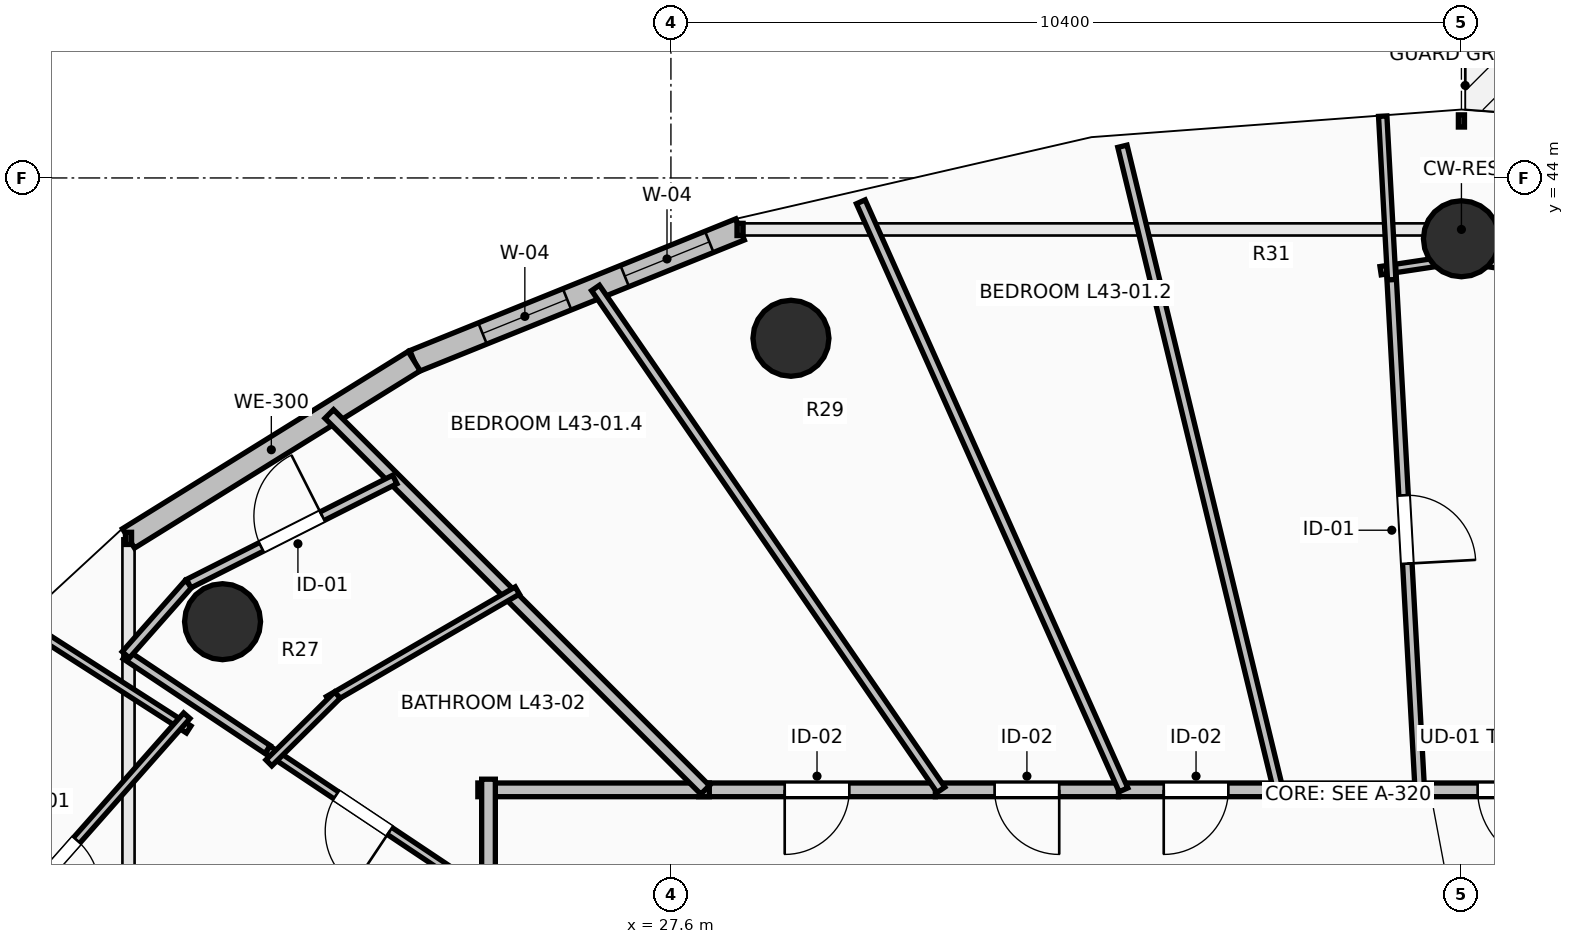
"""IFC4 building model, lengths in metres.
Left out: names, types, materials, properties, quantities, classifications, styles, units other than length and angle.
Written with IfcOpenShell. Run it as: python <this file> out.ifc"""

import sys

from ifc_helpers import new_model, si_unit, direction, frame, frame_2d, origin, origin_2d, place, context, subcontext, project, spatial, rectangle, circle, extrude, element, fill, save


model = new_model("IFC4")
c1 = context("Model", 3, precision=1e-05, world=origin(), true_north=direction((0.0, 1.0)))
c2 = subcontext(c1, "Body", "Model", "MODEL_VIEW")
j1 = project(units=[si_unit("LENGTHUNIT", "METRE"), si_unit("PLANEANGLEUNIT", "RADIAN")], contexts=[c1])
p1 = place(None, origin())
s1 = spatial("IfcSite", under=j1, at=p1, CompositionType="ELEMENT")
p2 = place(p1, origin())
s2 = spatial("IfcBuilding", under=s1, at=p2, CompositionType="ELEMENT")
p3 = place(p2, frame((0.0, 0.0, 160.6)))
s3 = spatial("IfcBuildingStorey", under=s2, at=p3, CompositionType="ELEMENT", Elevation=160.6)
for number, where, z_axis, x_axis in (
    (1, (38.0, 43.2, 0.0), (0.0, 0.0, 1.0), (0.0, 1.0, 0.0)),
    (2, (29.179, 41.891, 0.0), (0.0, 0.0, 1.0), (-0.383, 0.924, 0.0)),
    (3, (21.701, 38.162, 0.0), (0.0, 0.0, 1.0), (-0.707, 0.707, 0.0)),
):
    element("IfcColumn", number, at=place(p3, frame(where, z_axis=z_axis, x_axis=x_axis)), inside=s3, PredefinedType="COLUMN", context=c2, shape_type="SweptSolid", body=[
        extrude(circle(Radius=0.5, at=origin_2d()), origin(), (0.0, 0.0, 1.0), 3.5),
    ])
p4 = place(p3, frame((28.51, 43.323, 0.0), z_axis=(0.0, 0.0, 1.0), x_axis=(-0.927156504392, -0.374674280359, 0.0)))
e4 = element("IfcWall", 4, at=p4, inside=s3, PredefinedType="STANDARD", context=c2, shape_type="SweptSolid", body=[
    extrude(rectangle(XDim=4.625, YDim=0.3, at=frame_2d((2.312, 0.0))), origin(), (0.0, 0.0, 1.0), 3.24),
])
p5 = place(p4, frame((0.437, 0.0, 0.85)))
e5 = element("IfcOpeningElement", 5, at=p5, cuts=e4, PredefinedType="OPENING", context=c2, shape_type="SweptSolid", body=[
    extrude(rectangle(XDim=1.2, YDim=1.95, at=frame_2d((0.6, 0.975))), frame((0.0, 0.165, 0.0), z_axis=(0.0, -1.0, 0.0), x_axis=(1.0, 0.0, 0.0)), (0.0, 0.0, 1.0), 0.33),
])
p6 = place(p4, frame((2.454, 0.0, 0.85)))
e6 = element("IfcOpeningElement", 6, at=p6, cuts=e4, PredefinedType="OPENING", context=c2, shape_type="SweptSolid", body=[
    extrude(rectangle(XDim=1.2, YDim=1.95, at=frame_2d((0.6, 0.975))), frame((0.0, 0.165, 0.0), z_axis=(0.0, -1.0, 0.0), x_axis=(1.0, 0.0, 0.0)), (0.0, 0.0, 1.0), 0.33),
])
p7 = place(p3, frame((24.222, 41.59, 0.0), z_axis=(0.0, 0.0, 1.0), x_axis=(-0.849721181976, -0.527232313977, 0.0)))
e7 = element("IfcWall", 7, at=p7, inside=s3, PredefinedType="STANDARD", context=c2, shape_type="SweptSolid", body=[
    extrude(rectangle(XDim=4.423, YDim=0.3, at=frame_2d((2.211, 0.0))), origin(), (0.0, 0.0, 1.0), 3.24),
])
p8 = place(p3, frame((40.034, 35.95, 0.0), z_axis=(0.0, 0.0, 1.0), x_axis=(-1.0, 0.0, 0.0)))
e8 = element("IfcWall", 8, at=p8, inside=s3, PredefinedType="PARTITIONING", context=c2, shape_type="SweptSolid", body=[
    extrude(rectangle(XDim=2.642, YDim=0.18, at=frame_2d((1.321, 0.0))), origin(), (0.0, 0.0, 1.0), 3.24),
])
p9 = place(p8, frame((0.821, 0.0, 0.0)))
e9 = element("IfcOpeningElement", 9, at=p9, cuts=e8, PredefinedType="OPENING", context=c2, shape_type="SweptSolid", body=[
    extrude(rectangle(XDim=1.0, YDim=2.15, at=frame_2d((0.5, 1.075))), frame((0.0, 0.105, 0.0), z_axis=(0.0, -1.0, 0.0), x_axis=(1.0, 0.0, 0.0)), (0.0, 0.0, 1.0), 0.21),
])
p10 = place(p3, frame((37.392, 35.95, 0.0), z_axis=(0.0, 0.0, 1.0), x_axis=(-1.0, 0.0, 0.0)))
e10 = element("IfcWall", 10, at=p10, inside=s3, PredefinedType="PARTITIONING", context=c2, shape_type="SweptSolid", body=[
    extrude(rectangle(XDim=1.863, YDim=0.18, at=frame_2d((0.932, 0.0))), origin(), (0.0, 0.0, 1.0), 3.24),
])
p11 = place(p3, frame((35.529, 35.95, 0.0), z_axis=(0.0, 0.0, 1.0), x_axis=(-1.0, 0.0, 0.0)))
e11 = element("IfcWall", 11, at=p11, inside=s3, PredefinedType="PARTITIONING", context=c2, shape_type="SweptSolid", body=[
    extrude(rectangle(XDim=2.041, YDim=0.18, at=frame_2d((1.021, 0.0))), origin(), (0.0, 0.0, 1.0), 3.24),
])
p12 = place(p11, frame((0.595, 0.0, 0.0)))
e12 = element("IfcOpeningElement", 12, at=p12, cuts=e11, PredefinedType="OPENING", context=c2, shape_type="SweptSolid", body=[
    extrude(rectangle(XDim=0.85, YDim=2.1, at=frame_2d((0.425, 1.05))), frame((0.0, 0.105, 0.0), z_axis=(0.0, -1.0, 0.0), x_axis=(1.0, 0.0, 0.0)), (0.0, 0.0, 1.0), 0.21),
])
p13 = place(p3, frame((33.488, 35.95, 0.0), z_axis=(0.0, 0.0, 1.0), x_axis=(-1.0, 0.0, 0.0)))
e13 = element("IfcWall", 13, at=p13, inside=s3, PredefinedType="PARTITIONING", context=c2, shape_type="SweptSolid", body=[
    extrude(rectangle(XDim=2.409, YDim=0.18, at=frame_2d((1.205, 0.0))), origin(), (0.0, 0.0, 1.0), 3.24),
])
p14 = place(p13, frame((0.78, 0.0, 0.0)))
e14 = element("IfcOpeningElement", 14, at=p14, cuts=e13, PredefinedType="OPENING", context=c2, shape_type="SweptSolid", body=[
    extrude(rectangle(XDim=0.85, YDim=2.1, at=frame_2d((0.425, 1.05))), frame((0.0, 0.105, 0.0), z_axis=(0.0, -1.0, 0.0), x_axis=(1.0, 0.0, 0.0)), (0.0, 0.0, 1.0), 0.21),
])
p15 = place(p3, frame((31.079, 35.95, 0.0), z_axis=(0.0, 0.0, 1.0), x_axis=(-1.0, 0.0, 0.0)))
e15 = element("IfcWall", 15, at=p15, inside=s3, PredefinedType="PARTITIONING", context=c2, shape_type="SweptSolid", body=[
    extrude(rectangle(XDim=3.114, YDim=0.18, at=frame_2d((1.557, 0.0))), origin(), (0.0, 0.0, 1.0), 2.432),
])
p16 = place(p15, frame((1.132, 0.0, 0.0)))
e16 = element("IfcOpeningElement", 16, at=p16, cuts=e15, PredefinedType="OPENING", context=c2, shape_type="SweptSolid", body=[
    extrude(rectangle(XDim=0.85, YDim=2.1, at=frame_2d((0.425, 1.05))), frame((0.0, 0.105, 0.0), z_axis=(0.0, -1.0, 0.0), x_axis=(1.0, 0.0, 0.0)), (0.0, 0.0, 1.0), 0.21),
])
p17 = place(p3, frame((28.105, 35.95, 0.0), z_axis=(0.0, 0.0, 1.0), x_axis=(-1.0, 0.0, 0.0)))
e17 = element("IfcWall", 17, at=p17, inside=s3, PredefinedType="PARTITIONING", context=c2, shape_type="SweptSolid", body=[
    extrude(rectangle(XDim=3.045, YDim=0.18, at=frame_2d((1.522, 0.0))), origin(), (0.0, 0.0, 1.0), 2.432),
])
p18 = place(p3, frame((25.2, 36.09, 0.0), z_axis=(0.0, 0.0, 1.0), x_axis=(0.0, -1.0, 0.0)))
e18 = element("IfcWall", 18, at=p18, inside=s3, PredefinedType="PARTITIONING", context=c2, shape_type="SweptSolid", body=[
    extrude(rectangle(XDim=1.617, YDim=0.18, at=frame_2d((0.809, 0.0))), origin(), (0.0, 0.0, 1.0), 2.432),
])
p19 = place(p3, frame((41.102, 42.473, 0.0), z_axis=(0.0, 0.0, 1.0), x_axis=(-0.98887178047, 0.148770298749, 0.0)))
e19 = element("IfcWall", 19, at=p19, inside=s3, PredefinedType="PARTITIONING", context=c2, shape_type="SweptSolid", body=[
    extrude(rectangle(XDim=3.277, YDim=0.11, at=frame_2d((1.639, 0.0))), origin(), (0.0, 0.0, 1.0), 2.432),
])
p20 = place(p19, frame((1.189, 0.0, 0.0)))
e20 = element("IfcOpeningElement", 20, at=p20, cuts=e19, PredefinedType="OPENING", context=c2, shape_type="SweptSolid", body=[
    extrude(rectangle(XDim=0.9, YDim=2.1, at=frame_2d((0.45, 1.05))), frame((0.0, 0.07, 0.0), z_axis=(0.0, -1.0, 0.0), x_axis=(1.0, 0.0, 0.0)), (0.0, 0.0, 1.0), 0.14),
])
p21 = place(p3, frame((38.138, 42.961, 0.0), z_axis=(0.0, 0.0, 1.0), x_axis=(-0.988920139242, -0.148448503534, 0.0)))
e21 = element("IfcWall", 21, at=p21, inside=s3, PredefinedType="PARTITIONING", context=c2, shape_type="SweptSolid", body=[
    extrude(rectangle(XDim=1.215, YDim=0.11, at=frame_2d((0.608, 0.0))), origin(), (0.0, 0.0, 1.0), 2.432),
])
p22 = place(p3, frame((37.075, 42.801, 0.0), z_axis=(0.0, 0.0, 1.0), x_axis=(0.054937930554, -0.998489771498, 0.0)))
e22 = element("IfcWall", 22, at=p22, inside=s3, PredefinedType="PARTITIONING", context=c2, shape_type="SweptSolid", body=[
    extrude(rectangle(XDim=6.861, YDim=0.125, at=frame_2d((3.431, 0.0))), origin(), (0.0, 0.0, 1.0), 2.432),
])
p23 = place(p22, frame((2.981, 0.0, 0.0)))
e23 = element("IfcOpeningElement", 23, at=p23, cuts=e22, PredefinedType="OPENING", context=c2, shape_type="SweptSolid", body=[
    extrude(rectangle(XDim=0.9, YDim=2.1, at=frame_2d((0.45, 1.05))), frame((0.0, 0.077, 0.0), z_axis=(0.0, -1.0, 0.0), x_axis=(1.0, 0.0, 0.0)), (0.0, 0.0, 1.0), 0.155),
])
p24 = place(p3, frame((36.964, 44.813, 0.0), z_axis=(0.0, 0.0, 1.0), x_axis=(0.054949193079, -0.998489151759, 0.0)))
e24 = element("IfcWall", 24, at=p24, inside=s3, PredefinedType="PARTITIONING", context=c2, shape_type="SweptSolid", body=[
    extrude(rectangle(XDim=2.155, YDim=0.11, at=frame_2d((1.077, 0.0))), origin(), (0.0, 0.0, 1.0), 2.432),
])
p25 = place(p3, frame((33.54, 44.417, 0.0), z_axis=(0.0, 0.0, 1.0), x_axis=(0.235427577375, -0.971891895126, 0.0)))
e25 = element("IfcWall", 25, at=p25, inside=s3, PredefinedType="PARTITIONING", context=c2, shape_type="SweptSolid", body=[
    extrude(rectangle(XDim=8.712, YDim=0.125, at=frame_2d((4.356, 0.0))), origin(), (0.0, 0.0, 1.0), 2.432),
])
p26 = place(p3, frame((30.098, 43.686, 0.0), z_axis=(0.0, 0.0, 1.0), x_axis=(0.407891512679, -0.913030401402, 0.0)))
e26 = element("IfcWall", 26, at=p26, inside=s3, PredefinedType="PARTITIONING", context=c2, shape_type="SweptSolid", body=[
    extrude(rectangle(XDim=8.473, YDim=0.125, at=frame_2d((4.236, 0.0))), origin(), (0.0, 0.0, 1.0), 2.432),
])
p27 = place(p3, frame((26.608, 42.553, 0.0), z_axis=(0.0, 0.0, 1.0), x_axis=(0.566919141794, -0.823773443774, 0.0)))
e27 = element("IfcWall", 27, at=p27, inside=s3, PredefinedType="PARTITIONING", context=c2, shape_type="SweptSolid", body=[
    extrude(rectangle(XDim=8.016, YDim=0.125, at=frame_2d((4.008, 0.0))), origin(), (0.0, 0.0, 1.0), 2.432),
])
p28 = place(p3, frame((23.105, 40.895, 0.0), z_axis=(0.0, 0.0, 1.0), x_axis=(0.707106781187, -0.707106781187, 0.0)))
e28 = element("IfcWall", 28, at=p28, inside=s3, PredefinedType="PARTITIONING", context=c2, shape_type="SweptSolid", body=[
    extrude(rectangle(XDim=6.993, YDim=0.16, at=frame_2d((3.497, 0.0))), origin(), (0.0, 0.0, 1.0), 2.432),
])
p29 = place(p3, frame((24.79, 34.815, 0.0), z_axis=(0.0, 0.0, 1.0), x_axis=(-0.831749793219, 0.555150683581, 0.0)))
e29 = element("IfcWall", 29, at=p29, inside=s3, PredefinedType="PARTITIONING", context=c2, shape_type="SweptSolid", body=[
    extrude(rectangle(XDim=3.001, YDim=0.11, at=frame_2d((1.5, 0.0))), origin(), (0.0, 0.0, 1.0), 2.886),
])
p30 = place(p29, frame((1.068, 0.0, 0.0)))
e30 = element("IfcOpeningElement", 30, at=p30, cuts=e29, PredefinedType="OPENING", context=c2, shape_type="SweptSolid", body=[
    extrude(rectangle(XDim=0.85, YDim=2.1, at=frame_2d((0.425, 1.05))), frame((0.0, 0.07, 0.0), z_axis=(0.0, -1.0, 0.0), x_axis=(1.0, 0.0, 0.0)), (0.0, 0.0, 1.0), 0.14),
])
p31 = place(p3, frame((19.064, 38.151, 0.0), z_axis=(0.0, 0.0, 1.0), x_axis=(0.841644233319, -0.540032392104, 0.0)))
e31 = element("IfcWall", 31, at=p31, inside=s3, PredefinedType="PARTITIONING", context=c2, shape_type="SweptSolid", body=[
    extrude(rectangle(XDim=2.604, YDim=0.11, at=frame_2d((1.302, 0.0))), origin(), (0.0, 0.0, 1.0), 2.728),
])
p32 = place(p3, frame((21.231, 36.925, 0.0), z_axis=(0.0, 0.0, 1.0), x_axis=(-0.662281895209, -0.749254757261, 0.0)))
e32 = element("IfcWall", 32, at=p32, inside=s3, PredefinedType="PARTITIONING", context=c2, shape_type="SweptSolid", body=[
    extrude(rectangle(XDim=5.269, YDim=0.11, at=frame_2d((2.634, 0.0))), origin(), (0.0, 0.0, 1.0), 3.24),
])
p33 = place(p32, frame((2.184, 0.0, 0.0)))
e33 = element("IfcOpeningElement", 33, at=p33, cuts=e32, PredefinedType="OPENING", context=c2, shape_type="SweptSolid", body=[
    extrude(rectangle(XDim=0.9, YDim=2.1, at=frame_2d((0.45, 1.05))), frame((0.0, 0.07, 0.0), z_axis=(0.0, -1.0, 0.0), x_axis=(1.0, 0.0, 0.0)), (0.0, 0.0, 1.0), 0.14),
])
p34 = place(p3, frame((22.294, 36.481, 0.0), z_axis=(0.0, 0.0, 1.0), x_axis=(-0.831732018696, 0.555177313186, 0.0)))
e34 = element("IfcWall", 34, at=p34, inside=s3, PredefinedType="PARTITIONING", context=c2, shape_type="SweptSolid", body=[
    extrude(rectangle(XDim=2.243, YDim=0.125, at=frame_2d((1.122, 0.0))), origin(), (0.0, 0.0, 1.0), 2.728),
])
p35 = place(p3, frame((20.428, 37.726, 0.0), z_axis=(0.0, 0.0, 1.0), x_axis=(0.662228388064, 0.749302049938, 0.0)))
e35 = element("IfcWall", 35, at=p35, inside=s3, PredefinedType="PARTITIONING", context=c2, shape_type="SweptSolid", body=[
    extrude(rectangle(XDim=1.25, YDim=0.125, at=frame_2d((0.625, 0.0))), origin(), (0.0, 0.0, 1.0), 3.24),
])
p36 = place(p3, frame((21.256, 38.663, 0.0), z_axis=(0.0, 0.0, 1.0), x_axis=(0.892522213595, 0.451003434842, 0.0)))
e36 = element("IfcWall", 36, at=p36, inside=s3, PredefinedType="PARTITIONING", context=c2, shape_type="SweptSolid", body=[
    extrude(rectangle(XDim=3.037, YDim=0.125, at=frame_2d((1.519, 0.0))), origin(), (0.0, 0.0, 1.0), 3.24),
])
p37 = place(p36, frame((1.069, 0.0, 0.0)))
e37 = element("IfcOpeningElement", 37, at=p37, cuts=e36, PredefinedType="OPENING", context=c2, shape_type="SweptSolid", body=[
    extrude(rectangle(XDim=0.9, YDim=2.1, at=frame_2d((0.45, 1.05))), frame((0.0, 0.077, 0.0), z_axis=(0.0, -1.0, 0.0), x_axis=(1.0, 0.0, 0.0)), (0.0, 0.0, 1.0), 0.155),
])
p38 = place(p3, frame((25.579, 38.572, 0.0), z_axis=(0.0, 0.0, 1.0), x_axis=(-0.864754420197, -0.502194974835, 0.0)))
e38 = element("IfcWall", 38, at=p38, inside=s3, PredefinedType="PARTITIONING", context=c2, shape_type="SweptSolid", body=[
    extrude(rectangle(XDim=2.873, YDim=0.11, at=frame_2d((1.436, 0.0))), origin(), (0.0, 0.0, 1.0), 2.432),
])
p39 = place(p3, frame((23.213, 37.197, 0.0), z_axis=(0.0, 0.0, 1.0), x_axis=(-0.711040657556, -0.703150896538, 0.0)))
e39 = element("IfcWall", 39, at=p39, inside=s3, PredefinedType="PARTITIONING", context=c2, shape_type="SweptSolid", body=[
    extrude(rectangle(XDim=1.269, YDim=0.11, at=frame_2d((0.634, 0.0))), origin(), (0.0, 0.0, 1.0), 2.432),
])
p40 = place(p5, origin())
e40 = element("IfcWindow", 40, at=p40, inside=s3, PartitioningType="SINGLE_PANEL", PredefinedType="WINDOW", context=c2, shape_type="SweptSolid", body=[
    extrude(rectangle(XDim=1.2, YDim=1.95, at=frame_2d((0.6, 0.975))), frame((0.0, 0.03, 0.0), z_axis=(0.0, -1.0, 0.0), x_axis=(1.0, 0.0, 0.0)), (0.0, 0.0, 1.0), 0.06),
])
fill(e5, e40)
p41 = place(p6, origin())
e41 = element("IfcWindow", 41, at=p41, inside=s3, PartitioningType="SINGLE_PANEL", PredefinedType="WINDOW", context=c2, shape_type="SweptSolid", body=[
    extrude(rectangle(XDim=1.2, YDim=1.95, at=frame_2d((0.6, 0.975))), frame((0.0, 0.03, 0.0), z_axis=(0.0, -1.0, 0.0), x_axis=(1.0, 0.0, 0.0)), (0.0, 0.0, 1.0), 0.06),
])
fill(e6, e41)
p42 = place(p9, origin())
e42 = element("IfcDoor", 42, at=p42, inside=s3, OperationType="SINGLE_SWING_LEFT", PredefinedType="DOOR", context=c2, shape_type="SweptSolid", body=[
    extrude(rectangle(XDim=1.0, YDim=2.15, at=frame_2d((0.5, 1.075))), frame((0.0, 0.025, 0.0), z_axis=(0.0, -1.0, 0.0), x_axis=(1.0, 0.0, 0.0)), (0.0, 0.0, 1.0), 0.05),
])
fill(e9, e42)
p43 = place(p23, origin())
e43 = element("IfcDoor", 43, at=p43, inside=s3, OperationType="SINGLE_SWING_RIGHT", PredefinedType="DOOR", context=c2, shape_type="SweptSolid", body=[
    extrude(rectangle(XDim=0.9, YDim=2.1, at=frame_2d((0.45, 1.05))), frame((0.0, 0.025, 0.0), z_axis=(0.0, -1.0, 0.0), x_axis=(1.0, 0.0, 0.0)), (0.0, 0.0, 1.0), 0.05),
])
fill(e23, e43)
p44 = place(p30, origin())
e44 = element("IfcDoor", 44, at=p44, inside=s3, OperationType="SINGLE_SWING_LEFT", PredefinedType="DOOR", context=c2, shape_type="SweptSolid", body=[
    extrude(rectangle(XDim=0.85, YDim=2.1, at=frame_2d((0.425, 1.05))), frame((0.0, 0.025, 0.0), z_axis=(0.0, -1.0, 0.0), x_axis=(1.0, 0.0, 0.0)), (0.0, 0.0, 1.0), 0.05),
])
fill(e30, e44)
p45 = place(p33, origin())
e45 = element("IfcDoor", 45, at=p45, inside=s3, OperationType="SINGLE_SWING_RIGHT", PredefinedType="DOOR", context=c2, shape_type="SweptSolid", body=[
    extrude(rectangle(XDim=0.9, YDim=2.1, at=frame_2d((0.45, 1.05))), frame((0.0, 0.025, 0.0), z_axis=(0.0, -1.0, 0.0), x_axis=(1.0, 0.0, 0.0)), (0.0, 0.0, 1.0), 0.05),
])
fill(e33, e45)
p46 = place(p37, origin())
e46 = element("IfcDoor", 46, at=p46, inside=s3, OperationType="SINGLE_SWING_RIGHT", PredefinedType="DOOR", context=c2, shape_type="SweptSolid", body=[
    extrude(rectangle(XDim=0.9, YDim=2.1, at=frame_2d((0.45, 1.05))), frame((0.0, 0.025, 0.0), z_axis=(0.0, -1.0, 0.0), x_axis=(1.0, 0.0, 0.0)), (0.0, 0.0, 1.0), 0.05),
])
fill(e37, e46)
p47 = place(p12, origin())
e47 = element("IfcDoor", 47, at=p47, inside=s3, OperationType="SINGLE_SWING_RIGHT", PredefinedType="DOOR", context=c2, shape_type="SweptSolid", body=[
    extrude(rectangle(XDim=0.85, YDim=2.1, at=frame_2d((0.425, 1.05))), frame((0.0, 0.025, 0.0), z_axis=(0.0, -1.0, 0.0), x_axis=(1.0, 0.0, 0.0)), (0.0, 0.0, 1.0), 0.05),
])
fill(e12, e47)
p48 = place(p14, origin())
e48 = element("IfcDoor", 48, at=p48, inside=s3, OperationType="SINGLE_SWING_LEFT", PredefinedType="DOOR", context=c2, shape_type="SweptSolid", body=[
    extrude(rectangle(XDim=0.85, YDim=2.1, at=frame_2d((0.425, 1.05))), frame((0.0, 0.025, 0.0), z_axis=(0.0, -1.0, 0.0), x_axis=(1.0, 0.0, 0.0)), (0.0, 0.0, 1.0), 0.05),
])
fill(e14, e48)
p49 = place(p16, origin())
e49 = element("IfcDoor", 49, at=p49, inside=s3, OperationType="SINGLE_SWING_RIGHT", PredefinedType="DOOR", context=c2, shape_type="SweptSolid", body=[
    extrude(rectangle(XDim=0.85, YDim=2.1, at=frame_2d((0.425, 1.05))), frame((0.0, 0.025, 0.0), z_axis=(0.0, -1.0, 0.0), x_axis=(1.0, 0.0, 0.0)), (0.0, 0.0, 1.0), 0.05),
])
fill(e16, e49)
save(model, sys.argv[1])
